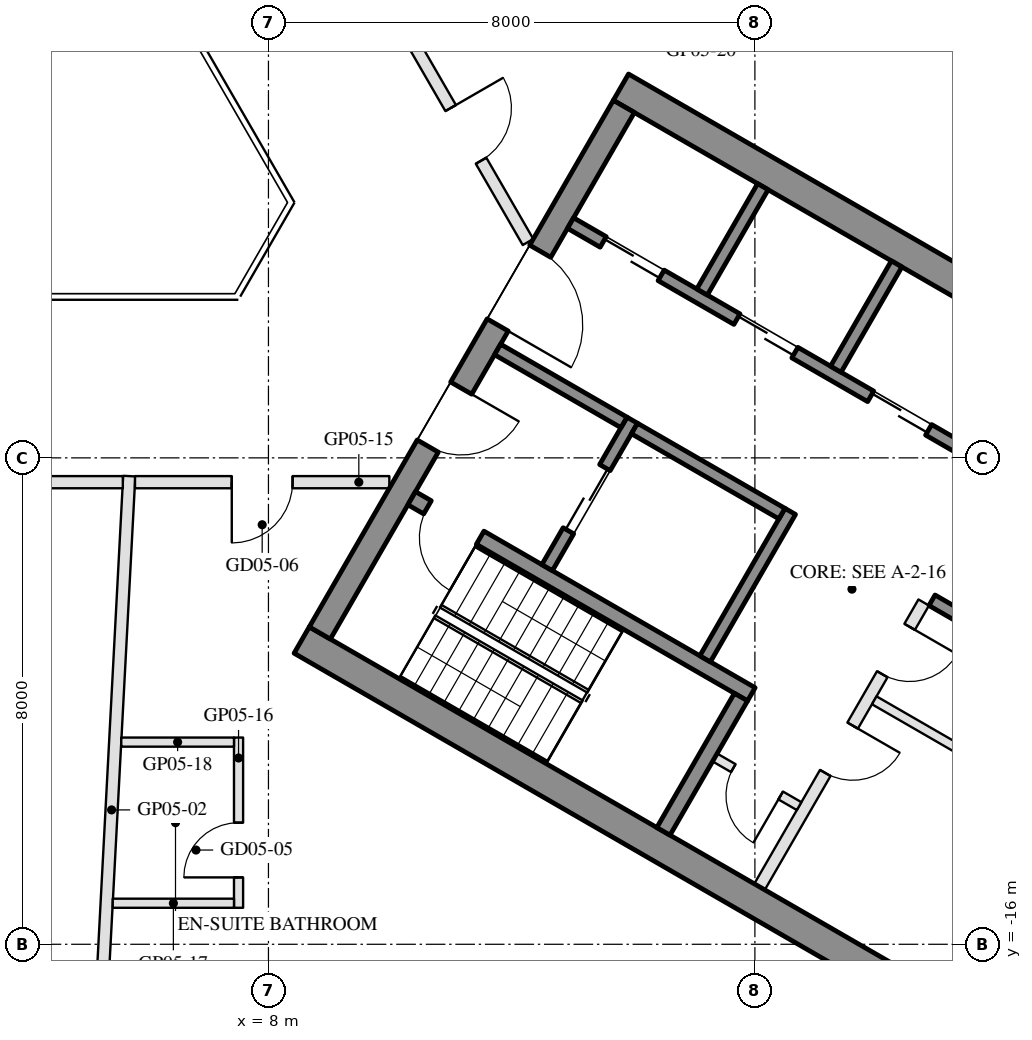
"""IFC4 building model, lengths in metres.
Left out: names, types, materials, properties, quantities, classifications, styles, units other than length and angle.
Written with IfcOpenShell. Run it as: python <this file> out.ifc"""

import sys

from ifc_helpers import new_model, si_unit, direction, frame, frame_2d, origin, place, context, subcontext, project, spatial, rectangle, extrude, element, fill, save


model = new_model("IFC4")
c1 = context("Model", 3, precision=1e-05, world=origin(), true_north=direction((0.0, 1.0)))
c2 = subcontext(c1, "Body", "Model", "MODEL_VIEW")
j1 = project(units=[si_unit("LENGTHUNIT", "METRE"), si_unit("PLANEANGLEUNIT", "RADIAN")], contexts=[c1])
p1 = place(None, origin())
s1 = spatial("IfcSite", under=j1, at=p1, CompositionType="ELEMENT")
p2 = place(p1, origin())
s2 = spatial("IfcBuilding", under=s1, at=p2, CompositionType="ELEMENT")
p3 = place(p2, frame((0.0, 0.0, 79.8)))
s3 = spatial("IfcBuildingStorey", under=s2, at=p3, CompositionType="ELEMENT", Elevation=79.8)
for number, where, z_axis, x_axis in (
    (1, (8.547, -10.997, 0.0), (0.0, 0.0, 1.0), (0.866, -0.5, 0.0)),
    (2, (13.797, -1.903, 0.0), (0.0, 0.0, 1.0), (0.866, -0.5, 0.0)),
):
    element("IfcWall", number, at=place(p3, frame(where, z_axis=z_axis, x_axis=x_axis)), inside=s3, PredefinedType="SHEAR", context=c2, shape_type="SweptSolid", body=[
        extrude(rectangle(XDim=14.837, YDim=0.5, at=frame_2d((7.418, 0.0))), origin(), (0.0, 0.0, 1.0), 3.5),
    ])
p4 = place(p3, frame((8.845, -10.88, 0.0), z_axis=(0.0, 0.0, 1.0), x_axis=(0.500004234368, 0.866022959057, 0.0)))
e3 = element("IfcWall", 3, at=p4, inside=s3, PredefinedType="SHEAR", context=c2, shape_type="SweptSolid", body=[
    extrude(rectangle(XDim=10.0, YDim=0.4, at=frame_2d((5.0, 0.0))), origin(), (0.0, 0.0, 1.0), 3.5),
])
p5 = place(p4, frame((3.55, 0.0, 0.0)))
e4 = element("IfcOpeningElement", 4, at=p5, cuts=e3, PredefinedType="OPENING", context=c2, shape_type="SweptSolid", body=[
    extrude(rectangle(XDim=1.1, YDim=2.1, at=frame_2d((0.55, 1.05))), frame((0.0, 0.21, 0.0), z_axis=(0.0, -1.0, 0.0), x_axis=(1.0, 0.0, 0.0)), (0.0, 0.0, 1.0), 0.42),
])
p6 = place(p4, frame((5.85, 0.0, 0.0)))
e5 = element("IfcOpeningElement", 5, at=p6, cuts=e3, PredefinedType="OPENING", context=c2, shape_type="SweptSolid", body=[
    extrude(rectangle(XDim=1.4, YDim=2.1, at=frame_2d((0.7, 1.05))), frame((0.0, 0.21, 0.0), z_axis=(0.0, -1.0, 0.0), x_axis=(1.0, 0.0, 0.0)), (0.0, 0.0, 1.0), 0.42),
])
p7 = place(p3, frame((10.356, -8.664, 0.0), z_axis=(0.0, 0.0, 1.0), x_axis=(0.866028629588, -0.499994412703, 0.0)))
e6 = element("IfcWall", 6, at=p7, inside=s3, PredefinedType="SHEAR", context=c2, shape_type="SweptSolid", body=[
    extrude(rectangle(XDim=6.45, YDim=0.25, at=frame_2d((3.225, 0.0))), origin(), (0.0, 0.0, 1.0), 3.5),
])
p8 = place(p7, frame((0.3, 0.0, 0.0)))
e7 = element("IfcOpeningElement", 7, at=p8, cuts=e6, PredefinedType="OPENING", context=c2, shape_type="SweptSolid", body=[
    extrude(rectangle(XDim=1.0, YDim=2.1, at=frame_2d((0.5, 1.05))), frame((0.0, 0.135, 0.0), z_axis=(0.0, -1.0, 0.0), x_axis=(1.0, 0.0, 0.0)), (0.0, 0.0, 1.0), 0.27),
])
p9 = place(p3, frame((14.496, -14.143, 0.0), z_axis=(0.0, 0.0, 1.0), x_axis=(0.500062241894, 0.865989465428, 0.0)))
e8 = element("IfcWall", 8, at=p9, inside=s3, PredefinedType="SHEAR", context=c2, shape_type="SweptSolid", body=[
    extrude(rectangle(XDim=2.55, YDim=0.25, at=frame_2d((1.275, 0.0))), origin(), (0.0, 0.0, 1.0), 3.5),
])
p10 = place(p3, frame((15.181, -11.305, 0.0), z_axis=(0.0, 0.0, 1.0), x_axis=(0.49994636267, 0.866056369097, 0.0)))
e9 = element("IfcWall", 9, at=p10, inside=s3, PredefinedType="SHEAR", context=c2, shape_type="SweptSolid", body=[
    extrude(rectangle(XDim=2.8, YDim=0.2, at=frame_2d((1.4, 0.0))), origin(), (0.0, 0.0, 1.0), 3.5),
])
p11 = place(p3, frame((12.583, -9.805, 0.0), z_axis=(0.0, 0.0, 1.0), x_axis=(0.49994636267, 0.866056369097, 0.0)))
e10 = element("IfcWall", 10, at=p11, inside=s3, PredefinedType="SHEAR", context=c2, shape_type="SweptSolid", body=[
    extrude(rectangle(XDim=2.8, YDim=0.2, at=frame_2d((1.4, 0.0))), origin(), (0.0, 0.0, 1.0), 3.5),
])
p12 = place(p11, frame((0.7, 0.0, 0.0)))
e11 = element("IfcOpeningElement", 11, at=p12, cuts=e10, PredefinedType="OPENING", context=c2, shape_type="SweptSolid", body=[
    extrude(rectangle(XDim=1.2, YDim=2.1, at=frame_2d((0.6, 1.05))), frame((0.0, 0.11, 0.0), z_axis=(0.0, -1.0, 0.0), x_axis=(1.0, 0.0, 0.0)), (0.0, 0.0, 1.0), 0.22),
])
p13 = place(p3, frame((11.768, -6.217, 0.0), z_axis=(0.0, 0.0, 1.0), x_axis=(0.866050077142, -0.499957262057, 0.0)))
e12 = element("IfcWall", 12, at=p13, inside=s3, PredefinedType="SHEAR", context=c2, shape_type="SweptSolid", body=[
    extrude(rectangle(XDim=2.4, YDim=0.2, at=frame_2d((1.2, 0.0))), origin(), (0.0, 0.0, 1.0), 3.5),
])
p14 = place(p3, frame((14.02, -7.517, 0.0), z_axis=(0.0, 0.0, 1.0), x_axis=(0.866034573852, -0.49998411664, 0.0)))
e13 = element("IfcWall", 13, at=p14, inside=s3, PredefinedType="SHEAR", context=c2, shape_type="SweptSolid", body=[
    extrude(rectangle(XDim=2.8, YDim=0.2, at=frame_2d((1.4, 0.0))), origin(), (0.0, 0.0, 1.0), 3.5),
])
p15 = place(p3, frame((12.968, -4.138, 0.0), z_axis=(0.0, 0.0, 1.0), x_axis=(0.866028328073, -0.49999493495, 0.0)))
e14 = element("IfcWall", 14, at=p15, inside=s3, PredefinedType="SHEAR", context=c2, shape_type="SweptSolid", body=[
    extrude(rectangle(XDim=10.16, YDim=0.2, at=frame_2d((5.08, 0.0))), origin(), (0.0, 0.0, 1.0), 3.5),
])
p16 = place(p15, frame((0.62, 0.0, 0.0)))
e15 = element("IfcOpeningElement", 15, at=p16, cuts=e14, PredefinedType="OPENING", context=c2, shape_type="SweptSolid", body=[
    extrude(rectangle(XDim=1.1, YDim=2.1, at=frame_2d((0.55, 1.05))), frame((0.0, 0.11, 0.0), z_axis=(0.0, -1.0, 0.0), x_axis=(1.0, 0.0, 0.0)), (0.0, 0.0, 1.0), 0.22),
])
p17 = place(p15, frame((3.16, 0.0, 0.0)))
e16 = element("IfcOpeningElement", 16, at=p17, cuts=e14, PredefinedType="OPENING", context=c2, shape_type="SweptSolid", body=[
    extrude(rectangle(XDim=1.1, YDim=2.1, at=frame_2d((0.55, 1.05))), frame((0.0, 0.11, 0.0), z_axis=(0.0, -1.0, 0.0), x_axis=(1.0, 0.0, 0.0)), (0.0, 0.0, 1.0), 0.22),
])
p18 = place(p15, frame((5.7, 0.0, 0.0)))
e17 = element("IfcOpeningElement", 17, at=p18, cuts=e14, PredefinedType="OPENING", context=c2, shape_type="SweptSolid", body=[
    extrude(rectangle(XDim=1.1, YDim=2.1, at=frame_2d((0.55, 1.05))), frame((0.0, 0.11, 0.0), z_axis=(0.0, -1.0, 0.0), x_axis=(1.0, 0.0, 0.0)), (0.0, 0.0, 1.0), 0.22),
])
p19 = place(p15, frame((8.24, 0.0, 0.0)))
e18 = element("IfcOpeningElement", 18, at=p19, cuts=e14, PredefinedType="OPENING", context=c2, shape_type="SweptSolid", body=[
    extrude(rectangle(XDim=1.1, YDim=2.1, at=frame_2d((0.55, 1.05))), frame((0.0, 0.11, 0.0), z_axis=(0.0, -1.0, 0.0), x_axis=(1.0, 0.0, 0.0)), (0.0, 0.0, 1.0), 0.22),
])
p20 = place(p3, frame((18.913, -10.342, 0.0), z_axis=(0.0, 0.0, 1.0), x_axis=(0.866038183914, -0.499977863513, 0.0)))
e19 = element("IfcWall", 19, at=p20, inside=s3, PredefinedType="SHEAR", context=c2, shape_type="SweptSolid", body=[
    extrude(rectangle(XDim=1.71, YDim=0.2, at=frame_2d((0.855, 0.0))), origin(), (0.0, 0.0, 1.0), 3.5),
])
for number, where, z_axis, x_axis in (
    (20, (15.131, -5.272, 0.0), (0.0, 0.0, 1.0), (0.5, 0.866, 0.0)),
    (21, (17.331, -6.542, 0.0), (0.0, 0.0, 1.0), (0.5, 0.866, 0.0)),
):
    element("IfcWall", number, at=place(p3, frame(where, z_axis=z_axis, x_axis=x_axis)), inside=s3, PredefinedType="SHEAR", context=c2, shape_type="SweptSolid", body=[
        extrude(rectangle(XDim=2.0, YDim=0.2, at=frame_2d((1.0, 0.0))), origin(), (0.0, 0.0, 1.0), 3.5),
    ])
p21 = place(p3, frame((16.076, -15.055, 0.0), z_axis=(0.0, 0.0, 1.0), x_axis=(0.499995103361, 0.866028230842, 0.0)))
e22 = element("IfcWall", 22, at=p21, inside=s3, PredefinedType="PARTITIONING", context=c2, shape_type="SweptSolid", body=[
    extrude(rectangle(XDim=5.4, YDim=0.2, at=frame_2d((2.7, 0.0))), origin(), (0.0, 0.0, 1.0), 3.5),
])
p22 = place(p21, frame((2.163, 0.0, 0.0)))
e23 = element("IfcOpeningElement", 23, at=p22, cuts=e22, PredefinedType="OPENING", context=c2, shape_type="SweptSolid", body=[
    extrude(rectangle(XDim=0.9, YDim=2.1, at=frame_2d((0.45, 1.05))), frame((0.0, 0.11, 0.0), z_axis=(0.0, -1.0, 0.0), x_axis=(1.0, 0.0, 0.0)), (0.0, 0.0, 1.0), 0.22),
])
p23 = place(p21, frame((4.038, 0.0, 0.0)))
e24 = element("IfcOpeningElement", 24, at=p23, cuts=e22, PredefinedType="OPENING", context=c2, shape_type="SweptSolid", body=[
    extrude(rectangle(XDim=0.9, YDim=2.1, at=frame_2d((0.45, 1.05))), frame((0.0, 0.11, 0.0), z_axis=(0.0, -1.0, 0.0), x_axis=(1.0, 0.0, 0.0)), (0.0, 0.0, 1.0), 0.22),
])
p24 = place(p3, frame((15.342, -12.928, 0.0), z_axis=(0.0, 0.0, 1.0), x_axis=(0.865989903783, -0.500061482766, 0.0)))
e25 = element("IfcWall", 25, at=p24, inside=s3, PredefinedType="PARTITIONING", context=c2, shape_type="SweptSolid", body=[
    extrude(rectangle(XDim=1.6, YDim=0.15, at=frame_2d((0.8, 0.0))), origin(), (0.0, 0.0, 1.0), 3.5),
])
p25 = place(p24, frame((0.35, 0.0, 0.0)))
e26 = element("IfcOpeningElement", 26, at=p25, cuts=e25, PredefinedType="OPENING", context=c2, shape_type="SweptSolid", body=[
    extrude(rectangle(XDim=0.9, YDim=2.1, at=frame_2d((0.45, 1.05))), frame((0.0, 0.085, 0.0), z_axis=(0.0, -1.0, 0.0), x_axis=(1.0, 0.0, 0.0)), (0.0, 0.0, 1.0), 0.17),
])
p26 = place(p3, frame((17.963, -11.987, 0.0), z_axis=(0.0, 0.0, 1.0), x_axis=(0.865998608524, -0.500046407882, 0.0)))
e27 = element("IfcWall", 27, at=p26, inside=s3, PredefinedType="PARTITIONING", context=c2, shape_type="SweptSolid", body=[
    extrude(rectangle(XDim=4.61, YDim=0.15, at=frame_2d((2.305, 0.0))), origin(), (0.0, 0.0, 1.0), 3.5),
])
p27 = place(p3, frame((5.13, -19.28, 0.0), z_axis=(0.0, 0.0, 1.0), x_axis=(0.052823378142, 0.998603870772, 0.0)))
e28 = element("IfcWall", 28, at=p27, inside=s3, PredefinedType="PARTITIONING", context=c2, shape_type="SweptSolid", body=[
    extrude(rectangle(XDim=10.995, YDim=0.2, at=frame_2d((5.498, 0.0))), origin(), (0.0, 0.0, 1.0), 2.96),
])
p28 = place(p3, frame((5.605, -8.4, 0.0), z_axis=(0.0, 0.0, 1.0), x_axis=(-1.0, 0.0, 0.0)))
e29 = element("IfcWall", 29, at=p28, inside=s3, PredefinedType="PARTITIONING", context=c2, shape_type="SweptSolid", body=[
    extrude(rectangle(XDim=8.107, YDim=0.2, at=frame_2d((4.054, 0.0))), origin(), (0.0, 0.0, 1.0), 2.95),
])
p29 = place(p28, frame((3.655, 0.0, 0.0)))
e30 = element("IfcOpeningElement", 30, at=p29, cuts=e29, PredefinedType="OPENING", context=c2, shape_type="SweptSolid", body=[
    extrude(rectangle(XDim=1.0, YDim=2.1, at=frame_2d((0.5, 1.05))), frame((0.0, 0.11, 0.0), z_axis=(0.0, -1.0, 0.0), x_axis=(1.0, 0.0, 0.0)), (0.0, 0.0, 1.0), 0.22),
])
p30 = place(p3, frame((9.988, -8.4, 0.0), z_axis=(0.0, 0.0, 1.0), x_axis=(-1.0, 0.0, 0.0)))
e31 = element("IfcWall", 31, at=p30, inside=s3, PredefinedType="PARTITIONING", context=c2, shape_type="SweptSolid", body=[
    extrude(rectangle(XDim=4.183, YDim=0.2, at=frame_2d((2.091, 0.0))), origin(), (0.0, 0.0, 1.0), 2.95),
])
p31 = place(p30, frame((1.591, 0.0, 0.0)))
e32 = element("IfcOpeningElement", 32, at=p31, cuts=e31, PredefinedType="OPENING", context=c2, shape_type="SweptSolid", body=[
    extrude(rectangle(XDim=1.0, YDim=2.1, at=frame_2d((0.5, 1.05))), frame((0.0, 0.11, 0.0), z_axis=(0.0, -1.0, 0.0), x_axis=(1.0, 0.0, 0.0)), (0.0, 0.0, 1.0), 0.22),
])
p32 = place(p3, frame((7.508, -15.4, 0.0), z_axis=(0.0, 0.0, 1.0), x_axis=(0.0, 1.0, 0.0)))
e33 = element("IfcWall", 33, at=p32, inside=s3, PredefinedType="PARTITIONING", context=c2, shape_type="SweptSolid", body=[
    extrude(rectangle(XDim=2.8, YDim=0.15, at=frame_2d((1.4, 0.0))), origin(), (0.0, 0.0, 1.0), 3.55),
])
p33 = place(p32, frame((0.5, 0.0, 0.0)))
e34 = element("IfcOpeningElement", 34, at=p33, cuts=e33, PredefinedType="OPENING", context=c2, shape_type="SweptSolid", body=[
    extrude(rectangle(XDim=0.9, YDim=2.1, at=frame_2d((0.45, 1.05))), frame((0.0, 0.085, 0.0), z_axis=(0.0, -1.0, 0.0), x_axis=(1.0, 0.0, 0.0)), (0.0, 0.0, 1.0), 0.17),
])
p34 = place(p3, frame((5.439, -15.325, 0.0), z_axis=(0.0, 0.0, 1.0), x_axis=(1.0, 0.0, 0.0)))
e35 = element("IfcWall", 35, at=p34, inside=s3, PredefinedType="PARTITIONING", context=c2, shape_type="SweptSolid", body=[
    extrude(rectangle(XDim=1.994, YDim=0.15, at=frame_2d((0.997, 0.0))), origin(), (0.0, 0.0, 1.0), 3.55),
])
p35 = place(p3, frame((5.579, -12.675, 0.0), z_axis=(0.0, 0.0, 1.0), x_axis=(1.0, 0.0, 0.0)))
e36 = element("IfcWall", 36, at=p35, inside=s3, PredefinedType="PARTITIONING", context=c2, shape_type="SweptSolid", body=[
    extrude(rectangle(XDim=1.854, YDim=0.15, at=frame_2d((0.927, 0.0))), origin(), (0.0, 0.0, 1.0), 3.55),
])
p36 = place(p3, frame((10.225, -0.909, 0.0), z_axis=(0.0, 0.0, 1.0), x_axis=(0.500011931275, -0.86601851515, 0.0)))
e37 = element("IfcWall", 37, at=p36, inside=s3, PredefinedType="PARTITIONING", context=c2, shape_type="SweptSolid", body=[
    extrude(rectangle(XDim=4.088, YDim=0.2, at=frame_2d((2.044, 0.0))), origin(), (0.0, 0.0, 1.0), 2.95),
])
p37 = place(p36, frame((1.544, 0.0, 0.0)))
e38 = element("IfcOpeningElement", 38, at=p37, cuts=e37, PredefinedType="OPENING", context=c2, shape_type="SweptSolid", body=[
    extrude(rectangle(XDim=1.0, YDim=2.1, at=frame_2d((0.5, 1.05))), frame((0.0, 0.11, 0.0), z_axis=(0.0, -1.0, 0.0), x_axis=(1.0, 0.0, 0.0)), (0.0, 0.0, 1.0), 0.22),
])
p38 = place(p12, origin())
e39 = element("IfcDoor", 39, at=p38, inside=s3, OperationType="DOUBLE_DOOR_SLIDING", PredefinedType="DOOR", context=c2, shape_type="SweptSolid", body=[
    extrude(rectangle(XDim=1.2, YDim=2.1, at=frame_2d((0.6, 1.05))), frame((0.0, 0.025, 0.0), z_axis=(0.0, -1.0, 0.0), x_axis=(1.0, 0.0, 0.0)), (0.0, 0.0, 1.0), 0.05),
])
fill(e11, e39)
p39 = place(p25, frame((0.9, 0.0, 0.0), z_axis=(0.0, 0.0, 1.0), x_axis=(-1.0, 0.0, 0.0)))
e40 = element("IfcDoor", 40, at=p39, inside=s3, OperationType="SINGLE_SWING_LEFT", PredefinedType="DOOR", context=c2, shape_type="SweptSolid", body=[
    extrude(rectangle(XDim=0.9, YDim=2.1, at=frame_2d((0.45, 1.05))), frame((0.0, 0.025, 0.0), z_axis=(0.0, -1.0, 0.0), x_axis=(1.0, 0.0, 0.0)), (0.0, 0.0, 1.0), 0.05),
])
fill(e26, e40)
p40 = place(p16, origin())
e41 = element("IfcDoor", 41, at=p40, inside=s3, OperationType="DOUBLE_DOOR_SLIDING", PredefinedType="DOOR", context=c2, shape_type="SweptSolid", body=[
    extrude(rectangle(XDim=1.1, YDim=2.1, at=frame_2d((0.55, 1.05))), frame((0.0, 0.025, 0.0), z_axis=(0.0, -1.0, 0.0), x_axis=(1.0, 0.0, 0.0)), (0.0, 0.0, 1.0), 0.05),
])
fill(e15, e41)
p41 = place(p17, origin())
e42 = element("IfcDoor", 42, at=p41, inside=s3, OperationType="DOUBLE_DOOR_SLIDING", PredefinedType="DOOR", context=c2, shape_type="SweptSolid", body=[
    extrude(rectangle(XDim=1.1, YDim=2.1, at=frame_2d((0.55, 1.05))), frame((0.0, 0.025, 0.0), z_axis=(0.0, -1.0, 0.0), x_axis=(1.0, 0.0, 0.0)), (0.0, 0.0, 1.0), 0.05),
])
fill(e16, e42)
p42 = place(p18, origin())
e43 = element("IfcDoor", 43, at=p42, inside=s3, OperationType="DOUBLE_DOOR_SLIDING", PredefinedType="DOOR", context=c2, shape_type="SweptSolid", body=[
    extrude(rectangle(XDim=1.1, YDim=2.1, at=frame_2d((0.55, 1.05))), frame((0.0, 0.025, 0.0), z_axis=(0.0, -1.0, 0.0), x_axis=(1.0, 0.0, 0.0)), (0.0, 0.0, 1.0), 0.05),
])
fill(e17, e43)
p43 = place(p22, frame((0.9, 0.0, 0.0), z_axis=(0.0, 0.0, 1.0), x_axis=(-1.0, 0.0, 0.0)))
e44 = element("IfcDoor", 44, at=p43, inside=s3, OperationType="SINGLE_SWING_LEFT", PredefinedType="DOOR", context=c2, shape_type="SweptSolid", body=[
    extrude(rectangle(XDim=0.9, YDim=2.1, at=frame_2d((0.45, 1.05))), frame((0.0, 0.025, 0.0), z_axis=(0.0, -1.0, 0.0), x_axis=(1.0, 0.0, 0.0)), (0.0, 0.0, 1.0), 0.05),
])
fill(e23, e44)
p44 = place(p23, frame((0.9, 0.0, 0.0), z_axis=(0.0, 0.0, 1.0), x_axis=(-1.0, 0.0, 0.0)))
e45 = element("IfcDoor", 45, at=p44, inside=s3, OperationType="SINGLE_SWING_LEFT", PredefinedType="DOOR", context=c2, shape_type="SweptSolid", body=[
    extrude(rectangle(XDim=0.9, YDim=2.1, at=frame_2d((0.45, 1.05))), frame((0.0, 0.025, 0.0), z_axis=(0.0, -1.0, 0.0), x_axis=(1.0, 0.0, 0.0)), (0.0, 0.0, 1.0), 0.05),
])
fill(e24, e45)
p45 = place(p5, frame((1.1, 0.0, 0.0), z_axis=(0.0, 0.0, 1.0), x_axis=(-1.0, 0.0, 0.0)))
e46 = element("IfcDoor", 46, at=p45, inside=s3, OperationType="SINGLE_SWING_LEFT", PredefinedType="DOOR", context=c2, shape_type="SweptSolid", body=[
    extrude(rectangle(XDim=1.1, YDim=2.1, at=frame_2d((0.55, 1.05))), frame((0.0, 0.025, 0.0), z_axis=(0.0, -1.0, 0.0), x_axis=(1.0, 0.0, 0.0)), (0.0, 0.0, 1.0), 0.05),
])
fill(e4, e46)
p46 = place(p6, frame((1.4, 0.0, 0.0), z_axis=(0.0, 0.0, 1.0), x_axis=(-1.0, 0.0, 0.0)))
e47 = element("IfcDoor", 47, at=p46, inside=s3, OperationType="DOUBLE_DOOR_SINGLE_SWING", PredefinedType="DOOR", context=c2, shape_type="SweptSolid", body=[
    extrude(rectangle(XDim=1.4, YDim=2.1, at=frame_2d((0.7, 1.05))), frame((0.0, 0.025, 0.0), z_axis=(0.0, -1.0, 0.0), x_axis=(1.0, 0.0, 0.0)), (0.0, 0.0, 1.0), 0.05),
])
fill(e5, e47)
p47 = place(p8, frame((1.0, 0.0, 0.0), z_axis=(0.0, 0.0, 1.0), x_axis=(-1.0, 0.0, 0.0)))
e48 = element("IfcDoor", 48, at=p47, inside=s3, OperationType="SINGLE_SWING_LEFT", PredefinedType="DOOR", context=c2, shape_type="SweptSolid", body=[
    extrude(rectangle(XDim=1.0, YDim=2.1, at=frame_2d((0.5, 1.05))), frame((0.0, 0.025, 0.0), z_axis=(0.0, -1.0, 0.0), x_axis=(1.0, 0.0, 0.0)), (0.0, 0.0, 1.0), 0.05),
])
fill(e7, e48)
p48 = place(p33, origin())
e49 = element("IfcDoor", 49, at=p48, inside=s3, OperationType="SINGLE_SWING_LEFT", PredefinedType="DOOR", context=c2, shape_type="SweptSolid", body=[
    extrude(rectangle(XDim=0.9, YDim=2.1, at=frame_2d((0.45, 1.05))), frame((0.0, 0.025, 0.0), z_axis=(0.0, -1.0, 0.0), x_axis=(1.0, 0.0, 0.0)), (0.0, 0.0, 1.0), 0.05),
])
fill(e34, e49)
p49 = place(p31, origin())
e50 = element("IfcDoor", 50, at=p49, inside=s3, OperationType="SINGLE_SWING_RIGHT", PredefinedType="DOOR", context=c2, shape_type="SweptSolid", body=[
    extrude(rectangle(XDim=1.0, YDim=2.1, at=frame_2d((0.5, 1.05))), frame((0.0, 0.025, 0.0), z_axis=(0.0, -1.0, 0.0), x_axis=(1.0, 0.0, 0.0)), (0.0, 0.0, 1.0), 0.05),
])
fill(e32, e50)
p50 = place(p37, origin())
e51 = element("IfcDoor", 51, at=p50, inside=s3, OperationType="SINGLE_SWING_LEFT", PredefinedType="DOOR", context=c2, shape_type="SweptSolid", body=[
    extrude(rectangle(XDim=1.0, YDim=2.1, at=frame_2d((0.5, 1.05))), frame((0.0, 0.025, 0.0), z_axis=(0.0, -1.0, 0.0), x_axis=(1.0, 0.0, 0.0)), (0.0, 0.0, 1.0), 0.05),
])
fill(e38, e51)
save(model, sys.argv[1])
